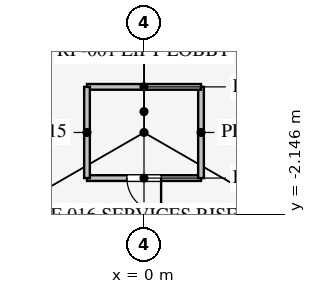
"""IFC4 building model, lengths in metres.
Left out: names, types, materials, properties, quantities, classifications, styles, units other than length and angle.
Written with IfcOpenShell. Run it as: python <this file> out.ifc"""

import sys

from ifc_helpers import new_model, si_unit, direction, frame, frame_2d, origin, place, context, subcontext, project, spatial, rectangle, extrude, element, fill, save


model = new_model("IFC4")
c1 = context("Model", 3, precision=1e-05, world=origin(), true_north=direction((0.0, 1.0)))
c2 = subcontext(c1, "Body", "Model", "MODEL_VIEW")
j1 = project(units=[si_unit("LENGTHUNIT", "METRE"), si_unit("PLANEANGLEUNIT", "RADIAN")], contexts=[c1])
p1 = place(None, origin())
s1 = spatial("IfcSite", under=j1, at=p1, CompositionType="ELEMENT")
p2 = place(p1, origin())
s2 = spatial("IfcBuilding", under=s1, at=p2, CompositionType="ELEMENT")
p3 = place(p2, frame((0.0, 0.0, 328.5)))
s3 = spatial("IfcBuildingStorey", under=s2, at=p3, CompositionType="ELEMENT", Elevation=328.5)
p4 = place(p3, frame((-1.5, -1.2, 0.0), z_axis=(0.0, 0.0, 1.0), x_axis=(1.0, 0.0, 0.0)))
e1 = element("IfcWall", 1, at=p4, inside=s3, PredefinedType="PARTITIONING", context=c2, shape_type="SweptSolid", body=[
    extrude(rectangle(XDim=3.0, YDim=0.15, at=frame_2d((1.5, 0.0))), origin(), (0.0, 0.0, 1.0), 3.2),
])
p5 = place(p4, frame((1.05, 0.0, 0.0)))
e2 = element("IfcOpeningElement", 2, at=p5, cuts=e1, PredefinedType="OPENING", context=c2, shape_type="SweptSolid", body=[
    extrude(rectangle(XDim=0.9, YDim=2.1, at=frame_2d((0.45, 1.05))), frame((0.0, 0.085, 0.0), z_axis=(0.0, -1.0, 0.0), x_axis=(1.0, 0.0, 0.0)), (0.0, 0.0, 1.0), 0.17),
])
p6 = place(p3, frame((1.5, -1.2, 0.0), z_axis=(0.0, 0.0, 1.0), x_axis=(0.0, 1.0, 0.0)))
e3 = element("IfcWall", 3, at=p6, inside=s3, PredefinedType="PARTITIONING", context=c2, shape_type="SweptSolid", body=[
    extrude(rectangle(XDim=2.4, YDim=0.15, at=frame_2d((1.2, 0.0))), origin(), (0.0, 0.0, 1.0), 3.2),
])
p7 = place(p3, frame((1.5, 1.2, 0.0), z_axis=(0.0, 0.0, 1.0), x_axis=(-1.0, 0.0, 0.0)))
e4 = element("IfcWall", 4, at=p7, inside=s3, PredefinedType="PARTITIONING", context=c2, shape_type="SweptSolid", body=[
    extrude(rectangle(XDim=3.0, YDim=0.15, at=frame_2d((1.5, 0.0))), origin(), (0.0, 0.0, 1.0), 3.2),
])
p8 = place(p3, frame((-1.5, 1.2, 0.0), z_axis=(0.0, 0.0, 1.0), x_axis=(0.0, -1.0, 0.0)))
e5 = element("IfcWall", 5, at=p8, inside=s3, PredefinedType="PARTITIONING", context=c2, shape_type="SweptSolid", body=[
    extrude(rectangle(XDim=2.4, YDim=0.15, at=frame_2d((1.2, 0.0))), origin(), (0.0, 0.0, 1.0), 3.2),
])
p9 = place(p5, frame((0.9, 0.0, 0.0), z_axis=(0.0, 0.0, 1.0), x_axis=(-1.0, 0.0, 0.0)))
e6 = element("IfcDoor", 6, at=p9, inside=s3, OperationType="SINGLE_SWING_LEFT", PredefinedType="DOOR", context=c2, shape_type="SweptSolid", body=[
    extrude(rectangle(XDim=0.9, YDim=2.1, at=frame_2d((0.45, 1.05))), frame((0.0, 0.025, 0.0), z_axis=(0.0, -1.0, 0.0), x_axis=(1.0, 0.0, 0.0)), (0.0, 0.0, 1.0), 0.05),
])
fill(e2, e6)
save(model, sys.argv[1])
